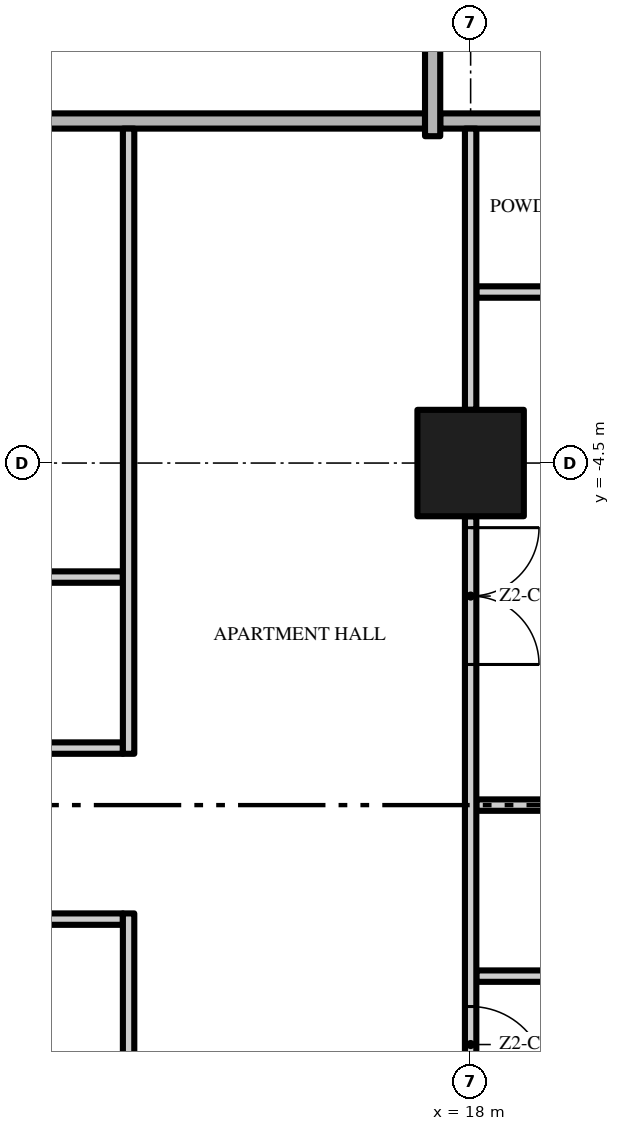
"""IFC4 building model, lengths in metres.
Left out: names, types, materials, properties, quantities, classifications, styles, units other than length and angle.
Written with IfcOpenShell. Run it as: python <this file> out.ifc"""

import sys

from ifc_helpers import new_model, si_unit, direction, frame, frame_2d, origin, origin_2d, place, context, subcontext, project, spatial, rectangle, extrude, element, fill, save


model = new_model("IFC4")
c1 = context("Model", 3, precision=1e-05, world=origin(), true_north=direction((0.0, 1.0)))
c2 = subcontext(c1, "Body", "Model", "MODEL_VIEW")
j1 = project(units=[si_unit("LENGTHUNIT", "METRE"), si_unit("PLANEANGLEUNIT", "RADIAN")], contexts=[c1])
p1 = place(None, origin())
s1 = spatial("IfcSite", under=j1, at=p1, CompositionType="ELEMENT")
p2 = place(p1, origin())
s2 = spatial("IfcBuilding", under=s1, at=p2, CompositionType="ELEMENT")
p3 = place(p2, frame((0.0, 0.0, 96.0)))
s3 = spatial("IfcBuildingStorey", under=s2, at=p3, CompositionType="ELEMENT", Elevation=96.0)
p4 = place(p3, frame((18.0, -4.5, 0.0), z_axis=(0.0, 0.0, 1.0), x_axis=(1.0, 0.0, 0.0)))
e1 = element("IfcColumn", 1, at=p4, inside=s3, PredefinedType="COLUMN", context=c2, shape_type="SweptSolid", body=[
    extrude(rectangle(XDim=1.4, YDim=1.4, at=origin_2d()), origin(), (0.0, 0.0, 1.0), 3.5),
])
p5 = place(p3, frame((18.075, -11.25, 0.0), z_axis=(0.0, 0.0, 1.0), x_axis=(1.0, 0.0, 0.0)))
e2 = element("IfcWall", 2, at=p5, inside=s3, PredefinedType="PARTITIONING", context=c2, shape_type="SweptSolid", body=[
    extrude(rectangle(XDim=2.85, YDim=0.15, at=frame_2d((1.425, 0.0))), origin(), (0.0, 0.0, 1.0), 3.5),
])
p6 = place(p3, frame((9.075, -10.5, 0.0), z_axis=(0.0, 0.0, 1.0), x_axis=(1.0, 0.0, 0.0)))
e3 = element("IfcWall", 3, at=p6, inside=s3, PredefinedType="PARTITIONING", context=c2, shape_type="SweptSolid", body=[
    extrude(rectangle(XDim=4.35, YDim=0.15, at=frame_2d((2.175, 0.0))), origin(), (0.0, 0.0, 1.0), 3.5),
])
p7 = place(p3, frame((18.075, -9.0, 0.0), z_axis=(0.0, 0.0, 1.0), x_axis=(1.0, 0.0, 0.0)))
e4 = element("IfcWall", 4, at=p7, inside=s3, PredefinedType="PARTITIONING", context=c2, shape_type="SweptSolid", body=[
    extrude(rectangle(XDim=8.625, YDim=0.15, at=frame_2d((4.312, 0.0))), origin(), (0.0, 0.0, 1.0), 3.5),
])
p8 = place(p3, frame((9.075, -8.25, 0.0), z_axis=(0.0, 0.0, 1.0), x_axis=(1.0, 0.0, 0.0)))
e5 = element("IfcWall", 5, at=p8, inside=s3, PredefinedType="PARTITIONING", context=c2, shape_type="SweptSolid", body=[
    extrude(rectangle(XDim=4.35, YDim=0.15, at=frame_2d((2.175, 0.0))), origin(), (0.0, 0.0, 1.0), 3.5),
])
p9 = place(p8, frame((1.75, 0.0, 0.0)))
e6 = element("IfcOpeningElement", 6, at=p9, cuts=e5, PredefinedType="OPENING", context=c2, shape_type="SweptSolid", body=[
    extrude(rectangle(XDim=0.9, YDim=2.1, at=frame_2d((0.45, 1.05))), frame((0.0, 0.085, 0.0), z_axis=(0.0, -1.0, 0.0), x_axis=(1.0, 0.0, 0.0)), (0.0, 0.0, 1.0), 0.17),
])
p10 = place(p3, frame((9.075, -6.0, 0.0), z_axis=(0.0, 0.0, 1.0), x_axis=(1.0, 0.0, 0.0)))
e7 = element("IfcWall", 7, at=p10, inside=s3, PredefinedType="PARTITIONING", context=c2, shape_type="SweptSolid", body=[
    extrude(rectangle(XDim=4.35, YDim=0.15, at=frame_2d((2.175, 0.0))), origin(), (0.0, 0.0, 1.0), 3.5),
])
p11 = place(p3, frame((18.075, -2.25, 0.0), z_axis=(0.0, 0.0, 1.0), x_axis=(1.0, 0.0, 0.0)))
e8 = element("IfcWall", 8, at=p11, inside=s3, PredefinedType="PARTITIONING", context=c2, shape_type="SweptSolid", body=[
    extrude(rectangle(XDim=2.85, YDim=0.15, at=frame_2d((1.425, 0.0))), origin(), (0.0, 0.0, 1.0), 3.5),
])
p12 = place(p3, frame((4.6, 0.0, 0.0), z_axis=(0.0, 0.0, 1.0), x_axis=(1.0, 0.0, 0.0)))
e9 = element("IfcWall", 9, at=p12, inside=s3, PredefinedType="PARTITIONING", context=c2, shape_type="SweptSolid", body=[
    extrude(rectangle(XDim=12.8, YDim=0.2, at=frame_2d((6.4, 0.0))), origin(), (0.0, 0.0, 1.0), 3.5),
])
p13 = place(p3, frame((17.6, 0.0, 0.0), z_axis=(0.0, 0.0, 1.0), x_axis=(1.0, 0.0, 0.0)))
e10 = element("IfcWall", 10, at=p13, inside=s3, PredefinedType="PARTITIONING", context=c2, shape_type="SweptSolid", body=[
    extrude(rectangle(XDim=9.1, YDim=0.2, at=frame_2d((4.55, 0.0))), origin(), (0.0, 0.0, 1.0), 3.5),
])
p14 = place(p3, frame((13.5, -22.2, 0.0), z_axis=(0.0, 0.0, 1.0), x_axis=(0.0, 1.0, 0.0)))
e11 = element("IfcWall", 11, at=p14, inside=s3, PredefinedType="PARTITIONING", context=c2, shape_type="SweptSolid", body=[
    extrude(rectangle(XDim=11.775, YDim=0.15, at=frame_2d((5.888, 0.0))), origin(), (0.0, 0.0, 1.0), 3.5),
])
p15 = place(p14, frame((8.25, 0.0, 0.0)))
e12 = element("IfcOpeningElement", 12, at=p15, cuts=e11, PredefinedType="OPENING", context=c2, shape_type="SweptSolid", body=[
    extrude(rectangle(XDim=0.9, YDim=2.1, at=frame_2d((0.45, 1.05))), frame((0.0, 0.085, 0.0), z_axis=(0.0, -1.0, 0.0), x_axis=(1.0, 0.0, 0.0)), (0.0, 0.0, 1.0), 0.17),
])
p16 = place(p3, frame((13.5, -8.325, 0.0), z_axis=(0.0, 0.0, 1.0), x_axis=(0.0, 1.0, 0.0)))
e13 = element("IfcWall", 13, at=p16, inside=s3, PredefinedType="PARTITIONING", context=c2, shape_type="SweptSolid", body=[
    extrude(rectangle(XDim=8.225, YDim=0.15, at=frame_2d((4.112, 0.0))), origin(), (0.0, 0.0, 1.0), 3.5),
])
p17 = place(p3, frame((17.5, -0.2, 0.0), z_axis=(0.0, 0.0, 1.0), x_axis=(0.0, 1.0, 0.0)))
e14 = element("IfcWall", 14, at=p17, inside=s3, PredefinedType="PARTITIONING", context=c2, shape_type="SweptSolid", body=[
    extrude(rectangle(XDim=4.0, YDim=0.2, at=frame_2d((2.0, 0.0))), origin(), (0.0, 0.0, 1.0), 3.5),
])
p18 = place(p3, frame((18.0, -5.2, 0.0), z_axis=(0.0, 0.0, 1.0), x_axis=(0.0, -1.0, 0.0)))
e15 = element("IfcWall", 15, at=p18, inside=s3, PredefinedType="PARTITIONING", context=c2, shape_type="SweptSolid", body=[
    extrude(rectangle(XDim=7.6, YDim=0.15, at=frame_2d((3.8, 0.0))), origin(), (0.0, 0.0, 1.0), 3.5),
])
p19 = place(p18, frame((0.15, 0.0, 0.0)))
e16 = element("IfcOpeningElement", 16, at=p19, cuts=e15, PredefinedType="OPENING", context=c2, shape_type="SweptSolid", body=[
    extrude(rectangle(XDim=1.8, YDim=2.4, at=frame_2d((0.9, 1.2))), frame((0.0, 0.085, 0.0), z_axis=(0.0, -1.0, 0.0), x_axis=(1.0, 0.0, 0.0)), (0.0, 0.0, 1.0), 0.17),
])
p20 = place(p18, frame((6.45, 0.0, 0.0)))
e17 = element("IfcOpeningElement", 17, at=p20, cuts=e15, PredefinedType="OPENING", context=c2, shape_type="SweptSolid", body=[
    extrude(rectangle(XDim=1.0, YDim=2.4, at=frame_2d((0.5, 1.2))), frame((0.0, 0.085, 0.0), z_axis=(0.0, -1.0, 0.0), x_axis=(1.0, 0.0, 0.0)), (0.0, 0.0, 1.0), 0.17),
])
p21 = place(p3, frame((18.0, -3.8, 0.0), z_axis=(0.0, 0.0, 1.0), x_axis=(0.0, 1.0, 0.0)))
e18 = element("IfcWall", 18, at=p21, inside=s3, PredefinedType="PARTITIONING", context=c2, shape_type="SweptSolid", body=[
    extrude(rectangle(XDim=3.7, YDim=0.15, at=frame_2d((1.85, 0.0))), origin(), (0.0, 0.0, 1.0), 3.5),
])
p22 = place(p19, origin())
e19 = element("IfcDoor", 19, at=p22, inside=s3, OperationType="DOUBLE_DOOR_SINGLE_SWING", PredefinedType="DOOR", context=c2, shape_type="SweptSolid", body=[
    extrude(rectangle(XDim=1.8, YDim=2.4, at=frame_2d((0.9, 1.2))), frame((0.0, 0.025, 0.0), z_axis=(0.0, -1.0, 0.0), x_axis=(1.0, 0.0, 0.0)), (0.0, 0.0, 1.0), 0.05),
])
fill(e16, e19)
p23 = place(p20, origin())
e20 = element("IfcDoor", 20, at=p23, inside=s3, OperationType="SINGLE_SWING_RIGHT", PredefinedType="DOOR", context=c2, shape_type="SweptSolid", body=[
    extrude(rectangle(XDim=1.0, YDim=2.4, at=frame_2d((0.5, 1.2))), frame((0.0, 0.025, 0.0), z_axis=(0.0, -1.0, 0.0), x_axis=(1.0, 0.0, 0.0)), (0.0, 0.0, 1.0), 0.05),
])
fill(e17, e20)
save(model, sys.argv[1])
